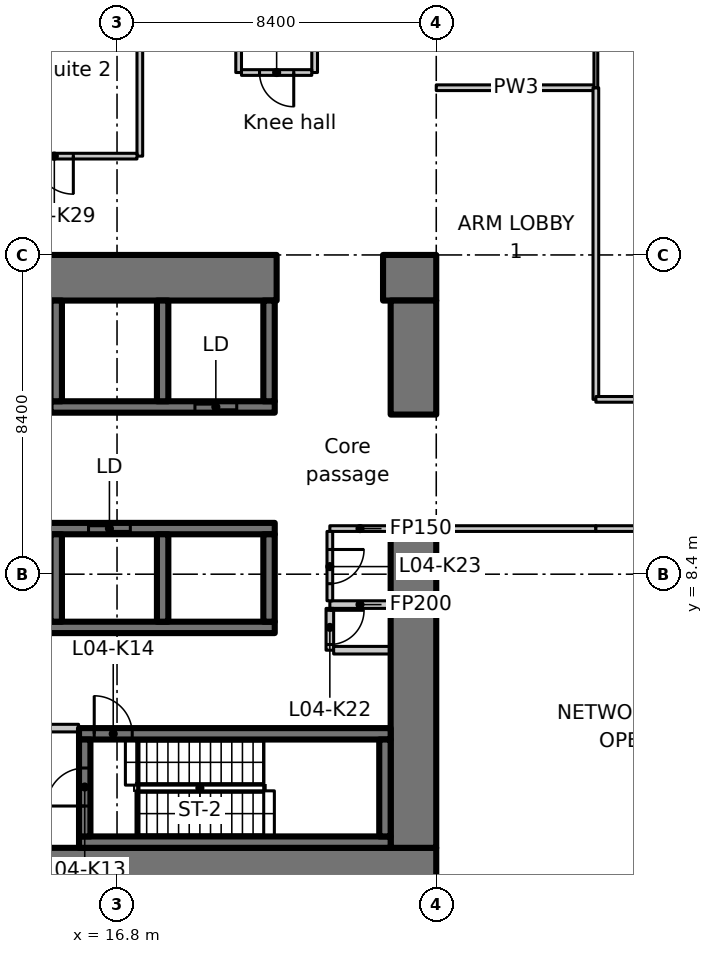
"""IFC4 building model, lengths in metres.
Left out: names, types, materials, properties, quantities, classifications, styles, units other than length and angle.
Written with IfcOpenShell. Run it as: python <this file> out.ifc"""

import sys

from ifc_helpers import new_model, si_unit, direction, frame, frame_2d, origin, place, context, subcontext, project, spatial, polyline, rectangle, outline, extrude, element, fill, save


model = new_model("IFC4")
c1 = context("Model", 3, precision=1e-05, world=origin(), true_north=direction((0.0, 1.0)))
c2 = subcontext(c1, "Body", "Model", "MODEL_VIEW")
j1 = project(units=[si_unit("LENGTHUNIT", "METRE"), si_unit("PLANEANGLEUNIT", "RADIAN")], contexts=[c1])
p1 = place(None, origin())
s1 = spatial("IfcSite", under=j1, at=p1, CompositionType="ELEMENT")
p2 = place(p1, origin())
s2 = spatial("IfcBuilding", under=s1, at=p2, CompositionType="ELEMENT")
p3 = place(p2, frame((0.0, 0.0, 27.5)))
s3 = spatial("IfcBuildingStorey", under=s2, at=p3, CompositionType="ELEMENT", Elevation=27.5)
p4 = place(p3, frame((6.736, 0.6, 0.0), z_axis=(0.0, 0.0, 1.0), x_axis=(1.0, 0.0, 0.0)))
e1 = element("IfcWall", 1, at=p4, inside=s3, PredefinedType="SHEAR", context=c2, shape_type="SweptSolid", body=[
    extrude(rectangle(XDim=18.464, YDim=1.2, at=frame_2d((9.232, 0.0))), origin(), (0.0, 0.0, 1.0), 4.25),
])
p5 = place(p3, frame((-1.1, 16.2, 0.0), z_axis=(0.0, 0.0, 1.0), x_axis=(1.0, 0.0, 0.0)))
e2 = element("IfcWall", 2, at=p5, inside=s3, PredefinedType="SHEAR", context=c2, shape_type="SweptSolid", body=[
    extrude(rectangle(XDim=22.1, YDim=1.2, at=frame_2d((11.05, 0.0))), origin(), (0.0, 0.0, 1.0), 4.25),
])
p6 = place(p5, frame((3.15, 0.0, 0.0)))
e3 = element("IfcOpeningElement", 3, at=p6, cuts=e2, PredefinedType="OPENING", context=c2, shape_type="SweptSolid", body=[
    extrude(rectangle(XDim=1.1, YDim=2.3, at=frame_2d((0.55, 1.15))), frame((0.0, 0.61, 0.0), z_axis=(0.0, -1.0, 0.0), x_axis=(1.0, 0.0, 0.0)), (0.0, 0.0, 1.0), 1.22),
])
p7 = place(p3, frame((23.8, 16.2, 0.0), z_axis=(0.0, 0.0, 1.0), x_axis=(1.0, 0.0, 0.0)))
e4 = element("IfcWall", 4, at=p7, inside=s3, PredefinedType="SHEAR", context=c2, shape_type="SweptSolid", body=[
    extrude(rectangle(XDim=1.4, YDim=1.2, at=frame_2d((0.7, 0.0))), origin(), (0.0, 0.0, 1.0), 4.25),
])
p8 = place(p3, frame((24.6, 1.2, 0.0), z_axis=(0.0, 0.0, 1.0), x_axis=(0.0, 1.0, 0.0)))
e5 = element("IfcWall", 5, at=p8, inside=s3, PredefinedType="SHEAR", context=c2, shape_type="SweptSolid", body=[
    extrude(rectangle(XDim=8.6, YDim=1.2, at=frame_2d((4.3, 0.0))), origin(), (0.0, 0.0, 1.0), 4.25),
])
p9 = place(p3, frame((24.6, 12.6, 0.0), z_axis=(0.0, 0.0, 1.0), x_axis=(0.0, 1.0, 0.0)))
e6 = element("IfcWall", 6, at=p9, inside=s3, PredefinedType="SHEAR", context=c2, shape_type="SweptSolid", body=[
    extrude(rectangle(XDim=3.0, YDim=1.2, at=frame_2d((1.5, 0.0))), origin(), (0.0, 0.0, 1.0), 4.25),
])
p10 = place(p3, frame((1.2, 7.0, 0.0), z_axis=(0.0, 0.0, 1.0), x_axis=(1.0, 0.0, 0.0)))
e7 = element("IfcWall", 7, at=p10, inside=s3, PredefinedType="SHEAR", context=c2, shape_type="SweptSolid", body=[
    extrude(rectangle(XDim=19.75, YDim=0.3, at=frame_2d((9.875, 0.0))), origin(), (0.0, 0.0, 1.0), 4.25),
])
p11 = place(p3, frame((1.2, 9.6, 0.0), z_axis=(0.0, 0.0, 1.0), x_axis=(1.0, 0.0, 0.0)))
e8 = element("IfcWall", 8, at=p11, inside=s3, PredefinedType="SHEAR", context=c2, shape_type="SweptSolid", body=[
    extrude(rectangle(XDim=19.75, YDim=0.3, at=frame_2d((9.875, 0.0))), origin(), (0.0, 0.0, 1.0), 4.25),
])
p12 = place(p11, frame((0.85, 0.0, 0.0)))
e9 = element("IfcOpeningElement", 9, at=p12, cuts=e8, PredefinedType="OPENING", context=c2, shape_type="SweptSolid", body=[
    extrude(rectangle(XDim=1.1, YDim=2.3, at=frame_2d((0.55, 1.15))), frame((0.0, 0.16, 0.0), z_axis=(0.0, -1.0, 0.0), x_axis=(1.0, 0.0, 0.0)), (0.0, 0.0, 1.0), 0.32),
])
p13 = place(p11, frame((3.65, 0.0, 0.0)))
e10 = element("IfcOpeningElement", 10, at=p13, cuts=e8, PredefinedType="OPENING", context=c2, shape_type="SweptSolid", body=[
    extrude(rectangle(XDim=1.1, YDim=2.3, at=frame_2d((0.55, 1.15))), frame((0.0, 0.16, 0.0), z_axis=(0.0, -1.0, 0.0), x_axis=(1.0, 0.0, 0.0)), (0.0, 0.0, 1.0), 0.32),
])
p14 = place(p11, frame((6.45, 0.0, 0.0)))
e11 = element("IfcOpeningElement", 11, at=p14, cuts=e8, PredefinedType="OPENING", context=c2, shape_type="SweptSolid", body=[
    extrude(rectangle(XDim=1.1, YDim=2.3, at=frame_2d((0.55, 1.15))), frame((0.0, 0.16, 0.0), z_axis=(0.0, -1.0, 0.0), x_axis=(1.0, 0.0, 0.0)), (0.0, 0.0, 1.0), 0.32),
])
p15 = place(p11, frame((9.25, 0.0, 0.0)))
e12 = element("IfcOpeningElement", 12, at=p15, cuts=e8, PredefinedType="OPENING", context=c2, shape_type="SweptSolid", body=[
    extrude(rectangle(XDim=1.1, YDim=2.3, at=frame_2d((0.55, 1.15))), frame((0.0, 0.16, 0.0), z_axis=(0.0, -1.0, 0.0), x_axis=(1.0, 0.0, 0.0)), (0.0, 0.0, 1.0), 0.32),
])
p16 = place(p11, frame((12.05, 0.0, 0.0)))
e13 = element("IfcOpeningElement", 13, at=p16, cuts=e8, PredefinedType="OPENING", context=c2, shape_type="SweptSolid", body=[
    extrude(rectangle(XDim=1.1, YDim=2.3, at=frame_2d((0.55, 1.15))), frame((0.0, 0.16, 0.0), z_axis=(0.0, -1.0, 0.0), x_axis=(1.0, 0.0, 0.0)), (0.0, 0.0, 1.0), 0.32),
])
p17 = place(p11, frame((14.85, 0.0, 0.0)))
e14 = element("IfcOpeningElement", 14, at=p17, cuts=e8, PredefinedType="OPENING", context=c2, shape_type="SweptSolid", body=[
    extrude(rectangle(XDim=1.1, YDim=2.3, at=frame_2d((0.55, 1.15))), frame((0.0, 0.16, 0.0), z_axis=(0.0, -1.0, 0.0), x_axis=(1.0, 0.0, 0.0)), (0.0, 0.0, 1.0), 0.32),
])
for number, where, z_axis, x_axis in (
    (15, (15.2, 7.15, 0.0), (0.0, 0.0, 1.0), (0.0, 1.0, 0.0)),
    (16, (18.0, 7.15, 0.0), (0.0, 0.0, 1.0), (0.0, 1.0, 0.0)),
    (17, (20.8, 7.15, 0.0), (0.0, 0.0, 1.0), (0.0, 1.0, 0.0)),
):
    element("IfcWall", number, at=place(p3, frame(where, z_axis=z_axis, x_axis=x_axis)), inside=s3, PredefinedType="SHEAR", context=c2, shape_type="SweptSolid", body=[
        extrude(rectangle(XDim=2.3, YDim=0.3, at=frame_2d((1.15, 0.0))), origin(), (0.0, 0.0, 1.0), 4.25),
    ])
p18 = place(p3, frame((15.05, 12.8, 0.0), z_axis=(0.0, 0.0, 1.0), x_axis=(1.0, 0.0, 0.0)))
e18 = element("IfcWall", 18, at=p18, inside=s3, PredefinedType="SHEAR", context=c2, shape_type="SweptSolid", body=[
    extrude(rectangle(XDim=5.9, YDim=0.3, at=frame_2d((2.95, 0.0))), origin(), (0.0, 0.0, 1.0), 4.25),
])
p19 = place(p18, frame((3.8, 0.0, 0.0)))
e19 = element("IfcOpeningElement", 19, at=p19, cuts=e18, PredefinedType="OPENING", context=c2, shape_type="SweptSolid", body=[
    extrude(rectangle(XDim=1.1, YDim=2.3, at=frame_2d((0.55, 1.15))), frame((0.0, 0.16, 0.0), z_axis=(0.0, -1.0, 0.0), x_axis=(1.0, 0.0, 0.0)), (0.0, 0.0, 1.0), 0.32),
])
for number, where, z_axis, x_axis in (
    (20, (15.2, 12.95, 0.0), (0.0, 0.0, 1.0), (0.0, 1.0, 0.0)),
    (21, (18.0, 12.95, 0.0), (0.0, 0.0, 1.0), (0.0, 1.0, 0.0)),
    (22, (20.8, 12.95, 0.0), (0.0, 0.0, 1.0), (0.0, 1.0, 0.0)),
):
    element("IfcWall", number, at=place(p3, frame(where, z_axis=z_axis, x_axis=x_axis)), inside=s3, PredefinedType="SHEAR", context=c2, shape_type="SweptSolid", body=[
        extrude(rectangle(XDim=2.65, YDim=0.3, at=frame_2d((1.325, 0.0))), origin(), (0.0, 0.0, 1.0), 4.25),
    ])
p20 = place(p3, frame((15.8, 1.35, 0.0), z_axis=(0.0, 0.0, 1.0), x_axis=(1.0, 0.0, 0.0)))
e23 = element("IfcWall", 23, at=p20, inside=s3, PredefinedType="SHEAR", context=c2, shape_type="SweptSolid", body=[
    extrude(rectangle(XDim=8.2, YDim=0.3, at=frame_2d((4.1, 0.0))), origin(), (0.0, 0.0, 1.0), 4.25),
])
p21 = place(p3, frame((15.8, 4.2, 0.0), z_axis=(0.0, 0.0, 1.0), x_axis=(1.0, 0.0, 0.0)))
e24 = element("IfcWall", 24, at=p21, inside=s3, PredefinedType="SHEAR", context=c2, shape_type="SweptSolid", body=[
    extrude(rectangle(XDim=8.2, YDim=0.3, at=frame_2d((4.1, 0.0))), origin(), (0.0, 0.0, 1.0), 4.25),
])
p22 = place(p21, frame((0.4, 0.0, 0.0)))
e25 = element("IfcOpeningElement", 25, at=p22, cuts=e24, PredefinedType="OPENING", context=c2, shape_type="SweptSolid", body=[
    extrude(rectangle(XDim=1.0, YDim=2.1, at=frame_2d((0.5, 1.05))), frame((0.0, 0.16, 0.0), z_axis=(0.0, -1.0, 0.0), x_axis=(1.0, 0.0, 0.0)), (0.0, 0.0, 1.0), 0.32),
])
p23 = place(p3, frame((15.95, 1.5, 0.0), z_axis=(0.0, 0.0, 1.0), x_axis=(0.0, 1.0, 0.0)))
e26 = element("IfcWall", 26, at=p23, inside=s3, PredefinedType="SHEAR", context=c2, shape_type="SweptSolid", body=[
    extrude(rectangle(XDim=2.55, YDim=0.3, at=frame_2d((1.275, 0.0))), origin(), (0.0, 0.0, 1.0), 4.25),
])
p24 = place(p23, frame((0.8, 0.0, 0.0)))
e27 = element("IfcOpeningElement", 27, at=p24, cuts=e26, PredefinedType="OPENING", context=c2, shape_type="SweptSolid", body=[
    extrude(rectangle(XDim=1.0, YDim=2.1, at=frame_2d((0.5, 1.05))), frame((0.0, 0.16, 0.0), z_axis=(0.0, -1.0, 0.0), x_axis=(1.0, 0.0, 0.0)), (0.0, 0.0, 1.0), 0.32),
])
p25 = place(p3, frame((23.85, 1.5, 0.0), z_axis=(0.0, 0.0, 1.0), x_axis=(0.0, 1.0, 0.0)))
e28 = element("IfcWall", 28, at=p25, inside=s3, PredefinedType="SHEAR", context=c2, shape_type="SweptSolid", body=[
    extrude(rectangle(XDim=2.55, YDim=0.3, at=frame_2d((1.275, 0.0))), origin(), (0.0, 0.0, 1.0), 4.25),
])
p26 = place(p3, frame((13.362, 4.35, 0.0), z_axis=(0.0, 0.0, 1.0), x_axis=(1.0, 0.0, 0.0)))
e29 = element("IfcWall", 29, at=p26, inside=s3, PredefinedType="PARTITIONING", context=c2, shape_type="SweptSolid", body=[
    extrude(rectangle(XDim=2.426, YDim=0.2, at=frame_2d((1.213, 0.0))), origin(), (0.0, 0.0, 1.0), 4.25),
])
p27 = place(p26, frame((0.638, 0.0, 0.0)))
e30 = element("IfcOpeningElement", 30, at=p27, cuts=e29, PredefinedType="OPENING", context=c2, shape_type="SweptSolid", body=[
    extrude(rectangle(XDim=1.0, YDim=2.1, at=frame_2d((0.5, 1.05))), frame((0.0, 0.11, 0.0), z_axis=(0.0, -1.0, 0.0), x_axis=(1.0, 0.0, 0.0)), (0.0, 0.0, 1.0), 0.22),
])
p28 = place(p3, frame((23.988, 7.6, 0.0), z_axis=(0.0, 0.0, 1.0), x_axis=(-1.0, 0.0, 0.0)))
e31 = element("IfcWall", 31, at=p28, inside=s3, PredefinedType="PARTITIONING", context=c2, shape_type="SweptSolid", body=[
    extrude(rectangle(XDim=1.588, YDim=0.2, at=frame_2d((0.794, 0.0))), origin(), (0.0, 0.0, 1.0), 4.25),
])
p29 = place(p3, frame((22.4, 7.5, 0.0), z_axis=(0.0, 0.0, 1.0), x_axis=(0.0, -1.0, 0.0)))
e32 = element("IfcWall", 32, at=p29, inside=s3, PredefinedType="PARTITIONING", context=c2, shape_type="SweptSolid", body=[
    extrude(rectangle(XDim=1.1, YDim=0.2, at=frame_2d((0.55, 0.0))), origin(), (0.0, 0.0, 1.0), 4.25),
])
p30 = place(p29, frame((0.05, 0.0, 0.0)))
e33 = element("IfcOpeningElement", 33, at=p30, cuts=e32, PredefinedType="OPENING", context=c2, shape_type="SweptSolid", body=[
    extrude(rectangle(XDim=0.9, YDim=2.1, at=frame_2d((0.45, 1.05))), frame((0.0, 0.11, 0.0), z_axis=(0.0, -1.0, 0.0), x_axis=(1.0, 0.0, 0.0)), (0.0, 0.0, 1.0), 0.22),
])
p31 = place(p3, frame((22.5, 6.4, 0.0), z_axis=(0.0, 0.0, 1.0), x_axis=(1.0, 0.0, 0.0)))
e34 = element("IfcWall", 34, at=p31, inside=s3, PredefinedType="PARTITIONING", context=c2, shape_type="SweptSolid", body=[
    extrude(rectangle(XDim=1.488, YDim=0.2, at=frame_2d((0.744, 0.0))), origin(), (0.0, 0.0, 1.0), 4.25),
])
p32 = place(p3, frame((17.4, 23.825, 0.0), z_axis=(0.0, 0.0, 1.0), x_axis=(0.0, -1.0, 0.0)))
e35 = element("IfcWall", 35, at=p32, inside=s3, PredefinedType="PARTITIONING", context=c2, shape_type="SweptSolid", body=[
    extrude(rectangle(XDim=4.425, YDim=0.15, at=frame_2d((2.212, 0.0))), origin(), (0.0, 0.0, 1.0), 4.25),
])
p33 = place(p3, frame((17.325, 19.4, 0.0), z_axis=(0.0, 0.0, 1.0), x_axis=(-1.0, 0.0, 0.0)))
e36 = element("IfcWall", 36, at=p33, inside=s3, PredefinedType="PARTITIONING", context=c2, shape_type="SweptSolid", body=[
    extrude(rectangle(XDim=4.425, YDim=0.15, at=frame_2d((2.212, 0.0))), origin(), (0.0, 0.0, 1.0), 4.25),
])
p34 = place(p33, frame((1.675, 0.0, 0.0)))
e37 = element("IfcOpeningElement", 37, at=p34, cuts=e36, PredefinedType="OPENING", context=c2, shape_type="SweptSolid", body=[
    extrude(rectangle(XDim=1.0, YDim=2.1, at=frame_2d((0.5, 1.05))), frame((0.0, 0.085, 0.0), z_axis=(0.0, -1.0, 0.0), x_axis=(1.0, 0.0, 0.0)), (0.0, 0.0, 1.0), 0.17),
])
p35 = place(p3, frame((23.988, 9.6, 0.0), z_axis=(0.0, 0.0, 1.0), x_axis=(-1.0, 0.0, 0.0)))
e38 = element("IfcWall", 38, at=p35, inside=s3, PredefinedType="PARTITIONING", context=c2, shape_type="SweptSolid", body=[
    extrude(rectangle(XDim=1.588, YDim=0.15, at=frame_2d((0.794, 0.0))), origin(), (0.0, 0.0, 1.0), 4.25),
])
p36 = place(p3, frame((22.4, 9.525, 0.0), z_axis=(0.0, 0.0, 1.0), x_axis=(0.0, -1.0, 0.0)))
e39 = element("IfcWall", 39, at=p36, inside=s3, PredefinedType="PARTITIONING", context=c2, shape_type="SweptSolid", body=[
    extrude(rectangle(XDim=1.825, YDim=0.15, at=frame_2d((0.913, 0.0))), origin(), (0.0, 0.0, 1.0), 4.25),
])
p37 = place(p36, frame((0.475, 0.0, 0.0)))
e40 = element("IfcOpeningElement", 40, at=p37, cuts=e39, PredefinedType="OPENING", context=c2, shape_type="SweptSolid", body=[
    extrude(rectangle(XDim=0.9, YDim=2.1, at=frame_2d((0.45, 1.05))), frame((0.0, 0.085, 0.0), z_axis=(0.0, -1.0, 0.0), x_axis=(1.0, 0.0, 0.0)), (0.0, 0.0, 1.0), 0.17),
])
p38 = place(p3, frame((20.0, 21.6, 0.0), z_axis=(0.0, 0.0, 1.0), x_axis=(0.0, 1.0, 0.0)))
e41 = element("IfcWall", 41, at=p38, inside=s3, PredefinedType="PARTITIONING", context=c2, shape_type="SweptSolid", body=[
    extrude(rectangle(XDim=2.4, YDim=0.15, at=frame_2d((1.2, 0.0))), origin(), (0.0, 0.0, 1.0), 4.25),
])
p39 = place(p3, frame((22.0, 23.925, 0.0), z_axis=(0.0, 0.0, 1.0), x_axis=(0.0, -1.0, 0.0)))
e42 = element("IfcWall", 42, at=p39, inside=s3, PredefinedType="PARTITIONING", context=c2, shape_type="SweptSolid", body=[
    extrude(rectangle(XDim=2.325, YDim=0.15, at=frame_2d((1.163, 0.0))), origin(), (0.0, 0.0, 1.0), 4.25),
])
p40 = place(p3, frame((21.925, 21.6, 0.0), z_axis=(0.0, 0.0, 1.0), x_axis=(-1.0, 0.0, 0.0)))
e43 = element("IfcWall", 43, at=p40, inside=s3, PredefinedType="PARTITIONING", context=c2, shape_type="SweptSolid", body=[
    extrude(rectangle(XDim=1.85, YDim=0.15, at=frame_2d((0.925, 0.0))), origin(), (0.0, 0.0, 1.0), 4.25),
])
p41 = place(p40, frame((0.475, 0.0, 0.0)))
e44 = element("IfcOpeningElement", 44, at=p41, cuts=e43, PredefinedType="OPENING", context=c2, shape_type="SweptSolid", body=[
    extrude(rectangle(XDim=0.9, YDim=2.1, at=frame_2d((0.45, 1.05))), frame((0.0, 0.085, 0.0), z_axis=(0.0, -1.0, 0.0), x_axis=(1.0, 0.0, 0.0)), (0.0, 0.0, 1.0), 0.17),
])
for number, where, z_axis, x_axis in (
    (45, (25.2, 21.2, 0.0), (0.0, 0.0, 1.0), (1.0, 0.0, 0.0)),
    (46, (29.4, 9.6, 0.0), (0.0, 0.0, 1.0), (-1.0, 0.0, 0.0)),
):
    element("IfcWall", number, at=place(p3, frame(where, z_axis=z_axis, x_axis=x_axis)), inside=s3, PredefinedType="PARTITIONING", context=c2, shape_type="SweptSolid", body=[
        extrude(rectangle(XDim=4.2, YDim=0.15, at=frame_2d((2.1, 0.0))), origin(), (0.0, 0.0, 1.0), 4.23),
    ])
p42 = place(p3, frame((29.4, 21.2, 0.0), z_axis=(0.0, 0.0, 1.0), x_axis=(0.0, -1.0, 0.0)))
e47 = element("IfcWall", 47, at=p42, inside=s3, PredefinedType="PARTITIONING", context=c2, shape_type="SweptSolid", body=[
    extrude(rectangle(XDim=8.2, YDim=0.15, at=frame_2d((4.1, 0.0))), origin(), (0.0, 0.0, 1.0), 4.23),
])
p43 = place(p3, frame((29.4, 26.776, 0.0), z_axis=(0.0, 0.0, 1.0), x_axis=(0.0, -1.0, 0.0)))
e48 = element("IfcWall", 48, at=p43, inside=s3, PredefinedType="PARTITIONING", context=c2, shape_type="SweptSolid", body=[
    extrude(outline(polyline([(0.0, 0.0), (5.576, 0.0), (5.576, 4.23), (2.026, 4.23), (2.024, 3.88), (1.128, 3.88), (1.126, 4.23), (0.0, 4.23), (0.0, 0.0)])), frame((0.0, 0.05, 0.0), z_axis=(0.0, -1.0, 0.0), x_axis=(1.0, 0.0, 0.0)), (0.0, 0.0, 1.0), 0.1),
])
p44 = place(p3, frame((37.8, 9.6, 0.0), z_axis=(0.0, 0.0, 1.0), x_axis=(-1.0, 0.0, 0.0)))
e49 = element("IfcWall", 49, at=p44, inside=s3, PredefinedType="PARTITIONING", context=c2, shape_type="SweptSolid", body=[
    extrude(rectangle(XDim=8.4, YDim=0.15, at=frame_2d((4.2, 0.0))), origin(), (0.0, 0.0, 1.0), 4.23),
])
p45 = place(p44, frame((1.5, 0.0, 0.0)))
e50 = element("IfcOpeningElement", 50, at=p45, cuts=e49, PredefinedType="OPENING", context=c2, shape_type="SweptSolid", body=[
    extrude(rectangle(XDim=1.8, YDim=2.1, at=frame_2d((0.9, 1.05))), frame((0.0, 0.085, 0.0), z_axis=(0.0, -1.0, 0.0), x_axis=(1.0, 0.0, 0.0)), (0.0, 0.0, 1.0), 0.17),
])
p46 = place(p3, frame((29.4, 13.0, 0.0), z_axis=(0.0, 0.0, 1.0), x_axis=(1.0, 0.0, 0.0)))
e51 = element("IfcWall", 51, at=p46, inside=s3, PredefinedType="PARTITIONING", context=c2, shape_type="SweptSolid", body=[
    extrude(rectangle(XDim=8.4, YDim=0.15, at=frame_2d((4.2, 0.0))), origin(), (0.0, 0.0, 1.0), 4.23),
])
p47 = place(p46, frame((3.3, 0.0, 0.0)))
e52 = element("IfcOpeningElement", 52, at=p47, cuts=e51, PredefinedType="OPENING", context=c2, shape_type="SweptSolid", body=[
    extrude(rectangle(XDim=1.8, YDim=2.1, at=frame_2d((0.9, 1.05))), frame((0.0, 0.085, 0.0), z_axis=(0.0, -1.0, 0.0), x_axis=(1.0, 0.0, 0.0)), (0.0, 0.0, 1.0), 0.17),
])
p48 = place(p17, origin())
e53 = element("IfcDoor", 53, at=p48, inside=s3, OperationType="SLIDING_TO_LEFT", PredefinedType="DOOR", context=c2, shape_type="SweptSolid", body=[
    extrude(rectangle(XDim=1.1, YDim=2.3, at=frame_2d((0.55, 1.15))), frame((0.0, 0.025, 0.0), z_axis=(0.0, -1.0, 0.0), x_axis=(1.0, 0.0, 0.0)), (0.0, 0.0, 1.0), 0.05),
])
fill(e14, e53)
p49 = place(p19, origin())
e54 = element("IfcDoor", 54, at=p49, inside=s3, OperationType="SLIDING_TO_LEFT", PredefinedType="DOOR", context=c2, shape_type="SweptSolid", body=[
    extrude(rectangle(XDim=1.1, YDim=2.3, at=frame_2d((0.55, 1.15))), frame((0.0, 0.025, 0.0), z_axis=(0.0, -1.0, 0.0), x_axis=(1.0, 0.0, 0.0)), (0.0, 0.0, 1.0), 0.05),
])
fill(e19, e54)
p50 = place(p24, origin())
e55 = element("IfcDoor", 55, at=p50, inside=s3, OperationType="SINGLE_SWING_LEFT", PredefinedType="DOOR", context=c2, shape_type="SweptSolid", body=[
    extrude(rectangle(XDim=1.0, YDim=2.1, at=frame_2d((0.5, 1.05))), frame((0.0, 0.025, 0.0), z_axis=(0.0, -1.0, 0.0), x_axis=(1.0, 0.0, 0.0)), (0.0, 0.0, 1.0), 0.05),
])
fill(e27, e55)
p51 = place(p22, origin())
e56 = element("IfcDoor", 56, at=p51, inside=s3, OperationType="SINGLE_SWING_RIGHT", PredefinedType="DOOR", context=c2, shape_type="SweptSolid", body=[
    extrude(rectangle(XDim=1.0, YDim=2.1, at=frame_2d((0.5, 1.05))), frame((0.0, 0.025, 0.0), z_axis=(0.0, -1.0, 0.0), x_axis=(1.0, 0.0, 0.0)), (0.0, 0.0, 1.0), 0.05),
])
fill(e25, e56)
p52 = place(p30, origin())
e57 = element("IfcDoor", 57, at=p52, inside=s3, OperationType="SINGLE_SWING_RIGHT", PredefinedType="DOOR", context=c2, shape_type="SweptSolid", body=[
    extrude(rectangle(XDim=0.9, YDim=2.1, at=frame_2d((0.45, 1.05))), frame((0.0, 0.025, 0.0), z_axis=(0.0, -1.0, 0.0), x_axis=(1.0, 0.0, 0.0)), (0.0, 0.0, 1.0), 0.05),
])
fill(e33, e57)
p53 = place(p37, origin())
e58 = element("IfcDoor", 58, at=p53, inside=s3, OperationType="SINGLE_SWING_LEFT", PredefinedType="DOOR", context=c2, shape_type="SweptSolid", body=[
    extrude(rectangle(XDim=0.9, YDim=2.1, at=frame_2d((0.45, 1.05))), frame((0.0, 0.025, 0.0), z_axis=(0.0, -1.0, 0.0), x_axis=(1.0, 0.0, 0.0)), (0.0, 0.0, 1.0), 0.05),
])
fill(e40, e58)
p54 = place(p41, origin())
e59 = element("IfcDoor", 59, at=p54, inside=s3, OperationType="SINGLE_SWING_LEFT", PredefinedType="DOOR", context=c2, shape_type="SweptSolid", body=[
    extrude(rectangle(XDim=0.9, YDim=2.1, at=frame_2d((0.45, 1.05))), frame((0.0, 0.025, 0.0), z_axis=(0.0, -1.0, 0.0), x_axis=(1.0, 0.0, 0.0)), (0.0, 0.0, 1.0), 0.05),
])
fill(e44, e59)
p55 = place(p34, origin())
e60 = element("IfcDoor", 60, at=p55, inside=s3, OperationType="SINGLE_SWING_LEFT", PredefinedType="DOOR", context=c2, shape_type="SweptSolid", body=[
    extrude(rectangle(XDim=1.0, YDim=2.1, at=frame_2d((0.5, 1.05))), frame((0.0, 0.025, 0.0), z_axis=(0.0, -1.0, 0.0), x_axis=(1.0, 0.0, 0.0)), (0.0, 0.0, 1.0), 0.05),
])
fill(e37, e60)
save(model, sys.argv[1])
